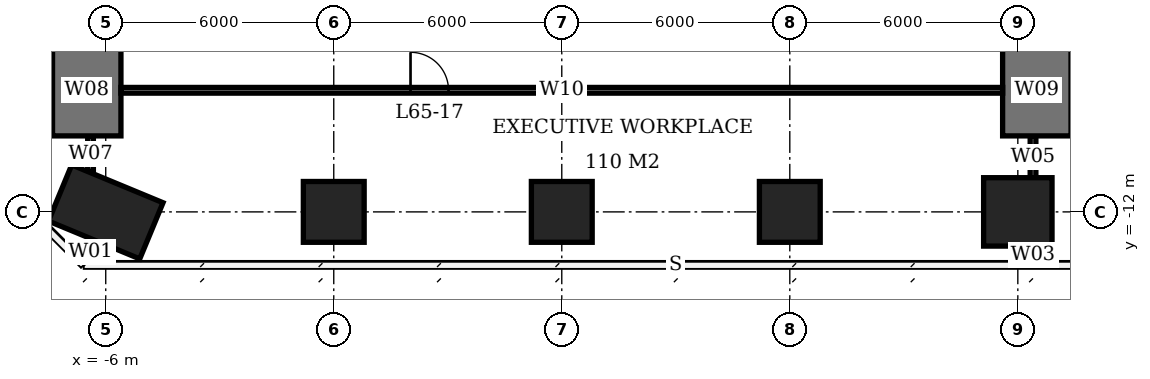
"""IFC4 building model, lengths in metres.
Left out: names, types, materials, properties, quantities, classifications, styles, units other than length and angle.
Written with IfcOpenShell. Run it as: python <this file> out.ifc"""

import sys

from ifc_helpers import new_model, si_unit, direction, frame, frame_2d, origin, origin_2d, place, context, subcontext, project, spatial, rectangle, extrude, element, fill, save


model = new_model("IFC4")
c1 = context("Model", 3, precision=1e-05, world=origin(), true_north=direction((0.0, 1.0)))
c2 = subcontext(c1, "Body", "Model", "MODEL_VIEW")
j1 = project(units=[si_unit("LENGTHUNIT", "METRE"), si_unit("PLANEANGLEUNIT", "RADIAN")], contexts=[c1])
p1 = place(None, origin())
s1 = spatial("IfcSite", under=j1, at=p1, CompositionType="ELEMENT")
p2 = place(p1, origin())
s2 = spatial("IfcBuilding", under=s1, at=p2, CompositionType="ELEMENT")
p3 = place(p2, frame((0.0, 0.0, 264.5)))
s3 = spatial("IfcBuildingStorey", under=s2, at=p3, CompositionType="ELEMENT", Elevation=264.5)
p4 = place(p3, frame((-6.0, -12.0, 0.0), z_axis=(0.0, 0.0, 1.0), x_axis=(-0.923879532511, 0.382683432365, 0.0)))
e1 = element("IfcColumn", 1, at=p4, inside=s3, PredefinedType="COLUMN", context=c2, shape_type="SweptSolid", body=[
    extrude(rectangle(XDim=2.6, YDim=1.6, at=origin_2d()), origin(), (0.0, 0.0, 1.0), 3.9),
])
for number, where, z_axis, x_axis in (
    (2, (0.0, -12.0, 0.0), (0.0, 0.0, 1.0), (1.0, 0.0, 0.0)),
    (3, (6.0, -12.0, 0.0), (0.0, 0.0, 1.0), (1.0, 0.0, 0.0)),
    (4, (12.0, -12.0, 0.0), (0.0, 0.0, 1.0), (1.0, 0.0, 0.0)),
):
    element("IfcColumn", number, at=place(p3, frame(where, z_axis=z_axis, x_axis=x_axis)), inside=s3, PredefinedType="COLUMN", context=c2, shape_type="SweptSolid", body=[
        extrude(rectangle(XDim=1.6, YDim=1.6, at=origin_2d()), origin(), (0.0, 0.0, 1.0), 3.9),
    ])
p5 = place(p3, frame((18.0, -12.0, 0.0), z_axis=(0.0, 0.0, 1.0), x_axis=(1.0, 0.0, 0.0)))
e5 = element("IfcColumn", 5, at=p5, inside=s3, PredefinedType="COLUMN", context=c2, shape_type="SweptSolid", body=[
    extrude(rectangle(XDim=1.8, YDim=1.8, at=origin_2d()), origin(), (0.0, 0.0, 1.0), 3.9),
])
for number, where, z_axis, x_axis in (
    (6, (-6.5, -10.0, 0.0), (0.0, 0.0, 1.0), (0.0, 1.0, 0.0)),
    (7, (18.5, -10.0, 0.0), (0.0, 0.0, 1.0), (0.0, 1.0, 0.0)),
):
    element("IfcWall", number, at=place(p3, frame(where, z_axis=z_axis, x_axis=x_axis)), inside=s3, PredefinedType="SHEAR", context=c2, shape_type="SweptSolid", body=[
        extrude(rectangle(XDim=2.4, YDim=1.8, at=frame_2d((1.2, 0.0))), origin(), (0.0, 0.0, 1.0), 3.9),
    ])
p6 = place(p3, frame((-6.4, -13.375, 0.0), z_axis=(0.0, 0.0, 1.0), x_axis=(0.0, 1.0, 0.0)))
e8 = element("IfcWall", 8, at=p6, inside=s3, PredefinedType="PARTITIONING", context=c2, shape_type="SweptSolid", body=[
    extrude(rectangle(XDim=0.644, YDim=0.15, at=frame_2d((0.322, 0.0))), origin(), (0.0, 0.0, 1.0), 2.65),
])
p7 = place(p3, frame((-6.4, -10.937, 0.0), z_axis=(0.0, 0.0, 1.0), x_axis=(0.0, 1.0, 0.0)))
e9 = element("IfcWall", 9, at=p7, inside=s3, PredefinedType="PARTITIONING", context=c2, shape_type="SweptSolid", body=[
    extrude(rectangle(XDim=0.937, YDim=0.15, at=frame_2d((0.469, 0.0))), origin(), (0.0, 0.0, 1.0), 3.65),
])
p8 = place(p3, frame((-5.6, -8.8, 0.0), z_axis=(0.0, 0.0, 1.0), x_axis=(1.0, 0.0, 0.0)))
e10 = element("IfcWall", 10, at=p8, inside=s3, PredefinedType="PARTITIONING", context=c2, shape_type="SweptSolid", body=[
    extrude(rectangle(XDim=23.2, YDim=0.15, at=frame_2d((11.6, 0.0))), origin(), (0.0, 0.0, 1.0), 3.65),
])
p9 = place(p8, frame((7.62, 0.0, 0.0)))
e11 = element("IfcOpeningElement", 11, at=p9, cuts=e10, PredefinedType="OPENING", context=c2, shape_type="SweptSolid", body=[
    extrude(rectangle(XDim=1.0, YDim=2.4, at=frame_2d((0.5, 1.2))), frame((0.0, 0.085, 0.0), z_axis=(0.0, -1.0, 0.0), x_axis=(1.0, 0.0, 0.0)), (0.0, 0.0, 1.0), 0.17),
])
p10 = place(p3, frame((18.4, -13.35, 0.0), z_axis=(0.0, 0.0, 1.0), x_axis=(0.0, 1.0, 0.0)))
e12 = element("IfcWall", 12, at=p10, inside=s3, PredefinedType="PARTITIONING", context=c2, shape_type="SweptSolid", body=[
    extrude(rectangle(XDim=0.45, YDim=0.15, at=frame_2d((0.225, 0.0))), origin(), (0.0, 0.0, 1.0), 2.65),
])
p11 = place(p3, frame((18.4, -11.1, 0.0), z_axis=(0.0, 0.0, 1.0), x_axis=(0.0, 1.0, 0.0)))
e13 = element("IfcWall", 13, at=p11, inside=s3, PredefinedType="PARTITIONING", context=c2, shape_type="SweptSolid", body=[
    extrude(rectangle(XDim=1.1, YDim=0.15, at=frame_2d((0.55, 0.0))), origin(), (0.0, 0.0, 1.0), 3.65),
])
p12 = place(p9, origin())
e14 = element("IfcDoor", 14, at=p12, inside=s3, OperationType="SINGLE_SWING_LEFT", PredefinedType="DOOR", context=c2, shape_type="SweptSolid", body=[
    extrude(rectangle(XDim=1.0, YDim=2.4, at=frame_2d((0.5, 1.2))), frame((0.0, 0.025, 0.0), z_axis=(0.0, -1.0, 0.0), x_axis=(1.0, 0.0, 0.0)), (0.0, 0.0, 1.0), 0.05),
])
fill(e11, e14)
save(model, sys.argv[1])
